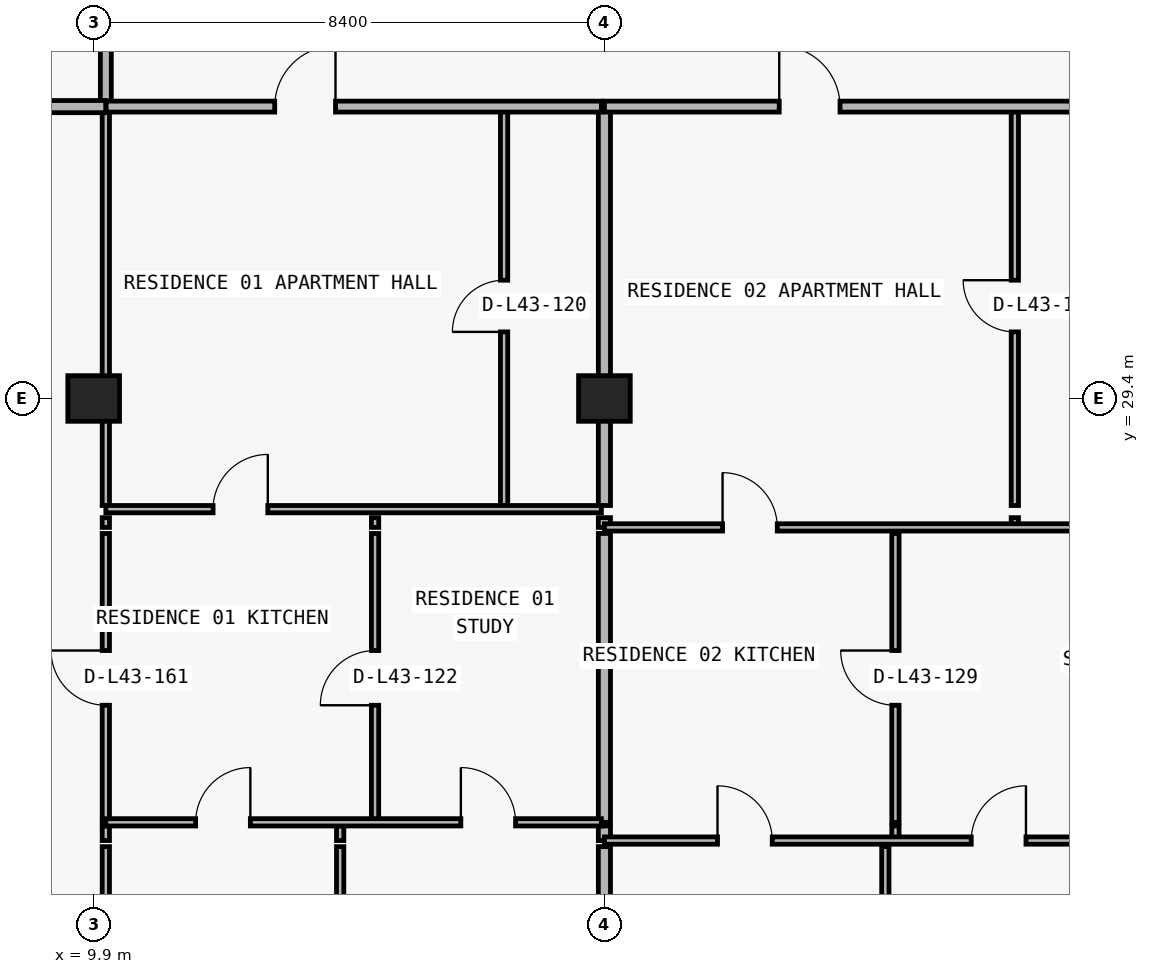
"""IFC4 building model, lengths in metres.
Left out: names, types, materials, properties, quantities, classifications, styles, units other than length and angle.
Written with IfcOpenShell. Run it as: python <this file> out.ifc"""

import sys

from ifc_helpers import new_model, si_unit, direction, frame, frame_2d, origin, origin_2d, place, context, subcontext, project, spatial, rectangle, extrude, element, fill, save


model = new_model("IFC4")
c1 = context("Model", 3, precision=1e-05, world=origin(), true_north=direction((0.0, 1.0)))
c2 = subcontext(c1, "Body", "Model", "MODEL_VIEW")
j1 = project(units=[si_unit("LENGTHUNIT", "METRE"), si_unit("PLANEANGLEUNIT", "RADIAN")], contexts=[c1])
p1 = place(None, origin())
s1 = spatial("IfcSite", under=j1, at=p1, CompositionType="ELEMENT")
p2 = place(p1, origin())
s2 = spatial("IfcBuilding", under=s1, at=p2, CompositionType="ELEMENT")
p3 = place(p2, frame((0.0, 0.0, 157.2)))
s3 = spatial("IfcBuildingStorey", under=s2, at=p3, CompositionType="ELEMENT", Elevation=157.2)
for number, where, z_axis, x_axis in (
    (1, (9.9, 29.4, 0.0), (0.0, 0.0, 1.0), (1.0, 0.0, 0.0)),
    (2, (18.3, 29.4, 0.0), (0.0, 0.0, 1.0), (1.0, 0.0, 0.0)),
):
    element("IfcColumn", number, at=place(p3, frame(where, z_axis=z_axis, x_axis=x_axis)), inside=s3, PredefinedType="COLUMN", context=c2, shape_type="SweptSolid", body=[
        extrude(rectangle(XDim=0.85, YDim=0.75, at=origin_2d()), origin(), (0.0, 0.0, 1.0), 3.05),
    ])
p4 = place(p3, frame((10.1, 11.285, 0.0), z_axis=(0.0, 0.0, 1.0), x_axis=(0.0, 1.0, 0.0)))
e3 = element("IfcWall", 3, at=p4, inside=s3, PredefinedType="PARTITIONING", context=c2, shape_type="SweptSolid", body=[
    extrude(rectangle(XDim=10.745, YDim=0.12, at=frame_2d((5.373, 0.0))), origin(), (0.0, 0.0, 1.0), 2.263),
])
p5 = place(p3, frame((10.1, 22.13, 0.0), z_axis=(0.0, 0.0, 1.0), x_axis=(0.0, 1.0, 0.0)))
e4 = element("IfcWall", 4, at=p5, inside=s3, PredefinedType="PARTITIONING", context=c2, shape_type="SweptSolid", body=[
    extrude(rectangle(XDim=0.24, YDim=0.12, at=frame_2d((0.12, 0.0))), origin(), (0.0, 0.0, 1.0), 2.263),
])
p6 = place(p3, frame((10.1, 22.43, 0.0), z_axis=(0.0, 0.0, 1.0), x_axis=(0.0, 1.0, 0.0)))
e5 = element("IfcWall", 5, at=p6, inside=s3, PredefinedType="PARTITIONING", context=c2, shape_type="SweptSolid", body=[
    extrude(rectangle(XDim=4.75, YDim=0.12, at=frame_2d((2.375, 0.0))), origin(), (0.0, 0.0, 1.0), 2.263),
])
p7 = place(p6, frame((1.925, 0.0, 0.0)))
e6 = element("IfcOpeningElement", 6, at=p7, cuts=e5, PredefinedType="OPENING", context=c2, shape_type="SweptSolid", body=[
    extrude(rectangle(XDim=0.9, YDim=2.15, at=frame_2d((0.45, 1.075))), frame((0.0, 0.07, 0.0), z_axis=(0.0, -1.0, 0.0), x_axis=(1.0, 0.0, 0.0)), (0.0, 0.0, 1.0), 0.14),
])
p8 = place(p3, frame((10.1, 27.28, 0.0), z_axis=(0.0, 0.0, 1.0), x_axis=(0.0, 1.0, 0.0)))
e7 = element("IfcWall", 7, at=p8, inside=s3, PredefinedType="PARTITIONING", context=c2, shape_type="SweptSolid", body=[
    extrude(rectangle(XDim=0.16, YDim=0.12, at=frame_2d((0.08, 0.0))), origin(), (0.0, 0.0, 1.0), 2.263),
])
p9 = place(p3, frame((10.1, 27.64, 0.0), z_axis=(0.0, 0.0, 1.0), x_axis=(0.0, 1.0, 0.0)))
e8 = element("IfcWall", 8, at=p9, inside=s3, PredefinedType="PARTITIONING", context=c2, shape_type="SweptSolid", body=[
    extrude(rectangle(XDim=6.56, YDim=0.12, at=frame_2d((3.28, 0.0))), origin(), (0.0, 0.0, 1.0), 2.263),
])
p10 = place(p3, frame((10.1, 34.205, 0.0), z_axis=(0.0, 0.0, 1.0), x_axis=(0.0, 1.0, 0.0)))
e9 = element("IfcWall", 9, at=p10, inside=s3, PredefinedType="PARTITIONING", context=c2, shape_type="SweptSolid", body=[
    extrude(rectangle(XDim=2.745, YDim=0.18, at=frame_2d((1.373, 0.0))), origin(), (0.0, 0.0, 1.0), 2.263),
])
p11 = place(p3, frame((13.954, 11.24, 0.0), z_axis=(0.0, 0.0, 1.0), x_axis=(0.0, 1.0, 0.0)))
e10 = element("IfcWall", 10, at=p11, inside=s3, PredefinedType="PARTITIONING", context=c2, shape_type="SweptSolid", body=[
    extrude(rectangle(XDim=10.79, YDim=0.12, at=frame_2d((5.395, 0.0))), origin(), (0.0, 0.0, 1.0), 2.725),
])
p12 = place(p3, frame((13.954, 22.13, 0.0), z_axis=(0.0, 0.0, 1.0), x_axis=(0.0, 1.0, 0.0)))
e11 = element("IfcWall", 11, at=p12, inside=s3, PredefinedType="PARTITIONING", context=c2, shape_type="SweptSolid", body=[
    extrude(rectangle(XDim=0.24, YDim=0.12, at=frame_2d((0.12, 0.0))), origin(), (0.0, 0.0, 1.0), 2.725),
])
p13 = place(p3, frame((14.528, 22.43, 0.0), z_axis=(0.0, 0.0, 1.0), x_axis=(0.0, 1.0, 0.0)))
e12 = element("IfcWall", 12, at=p13, inside=s3, PredefinedType="PARTITIONING", context=c2, shape_type="SweptSolid", body=[
    extrude(rectangle(XDim=4.75, YDim=0.12, at=frame_2d((2.375, 0.0))), origin(), (0.0, 0.0, 1.0), 3.05),
])
p14 = place(p13, frame((1.925, 0.0, 0.0)))
e13 = element("IfcOpeningElement", 13, at=p14, cuts=e12, PredefinedType="OPENING", context=c2, shape_type="SweptSolid", body=[
    extrude(rectangle(XDim=0.9, YDim=2.15, at=frame_2d((0.45, 1.075))), frame((0.0, 0.07, 0.0), z_axis=(0.0, -1.0, 0.0), x_axis=(1.0, 0.0, 0.0)), (0.0, 0.0, 1.0), 0.14),
])
p15 = place(p3, frame((14.528, 27.28, 0.0), z_axis=(0.0, 0.0, 1.0), x_axis=(0.0, 1.0, 0.0)))
e14 = element("IfcWall", 14, at=p15, inside=s3, PredefinedType="PARTITIONING", context=c2, shape_type="SweptSolid", body=[
    extrude(rectangle(XDim=0.16, YDim=0.12, at=frame_2d((0.08, 0.0))), origin(), (0.0, 0.0, 1.0), 3.05),
])
p16 = place(p3, frame((16.65, 27.64, 0.0), z_axis=(0.0, 0.0, 1.0), x_axis=(0.0, 1.0, 0.0)))
e15 = element("IfcWall", 15, at=p16, inside=s3, PredefinedType="PARTITIONING", context=c2, shape_type="SweptSolid", body=[
    extrude(rectangle(XDim=6.56, YDim=0.12, at=frame_2d((3.28, 0.0))), origin(), (0.0, 0.0, 1.0), 3.05),
])
p17 = place(p16, frame((2.855, 0.0, 0.0)))
e16 = element("IfcOpeningElement", 16, at=p17, cuts=e15, PredefinedType="OPENING", context=c2, shape_type="SweptSolid", body=[
    extrude(rectangle(XDim=0.85, YDim=2.1, at=frame_2d((0.425, 1.05))), frame((0.0, 0.07, 0.0), z_axis=(0.0, -1.0, 0.0), x_axis=(1.0, 0.0, 0.0)), (0.0, 0.0, 1.0), 0.14),
])
p18 = place(p3, frame((18.3, 11.24, 0.0), z_axis=(0.0, 0.0, 1.0), x_axis=(0.0, 1.0, 0.0)))
e17 = element("IfcWall", 17, at=p18, inside=s3, PredefinedType="PARTITIONING", context=c2, shape_type="SweptSolid", body=[
    extrude(rectangle(XDim=10.79, YDim=0.2, at=frame_2d((5.395, 0.0))), origin(), (0.0, 0.0, 1.0), 2.263),
])
p19 = place(p3, frame((18.3, 22.13, 0.0), z_axis=(0.0, 0.0, 1.0), x_axis=(0.0, 1.0, 0.0)))
e18 = element("IfcWall", 18, at=p19, inside=s3, PredefinedType="PARTITIONING", context=c2, shape_type="SweptSolid", body=[
    extrude(rectangle(XDim=0.24, YDim=0.2, at=frame_2d((0.12, 0.0))), origin(), (0.0, 0.0, 1.0), 2.263),
])
p20 = place(p3, frame((18.3, 22.43, 0.0), z_axis=(0.0, 0.0, 1.0), x_axis=(0.0, 1.0, 0.0)))
e19 = element("IfcWall", 19, at=p20, inside=s3, PredefinedType="PARTITIONING", context=c2, shape_type="SweptSolid", body=[
    extrude(rectangle(XDim=4.75, YDim=0.2, at=frame_2d((2.375, 0.0))), origin(), (0.0, 0.0, 1.0), 2.263),
])
p21 = place(p3, frame((18.3, 27.28, 0.0), z_axis=(0.0, 0.0, 1.0), x_axis=(0.0, 1.0, 0.0)))
e20 = element("IfcWall", 20, at=p21, inside=s3, PredefinedType="PARTITIONING", context=c2, shape_type="SweptSolid", body=[
    extrude(rectangle(XDim=0.16, YDim=0.2, at=frame_2d((0.08, 0.0))), origin(), (0.0, 0.0, 1.0), 2.263),
])
p22 = place(p3, frame((18.3, 27.64, 0.0), z_axis=(0.0, 0.0, 1.0), x_axis=(0.0, 1.0, 0.0)))
e21 = element("IfcWall", 21, at=p22, inside=s3, PredefinedType="PARTITIONING", context=c2, shape_type="SweptSolid", body=[
    extrude(rectangle(XDim=6.56, YDim=0.2, at=frame_2d((3.28, 0.0))), origin(), (0.0, 0.0, 1.0), 2.263),
])
p23 = place(p3, frame((22.92, 11.24, 0.0), z_axis=(0.0, 0.0, 1.0), x_axis=(0.0, 1.0, 0.0)))
e22 = element("IfcWall", 22, at=p23, inside=s3, PredefinedType="PARTITIONING", context=c2, shape_type="SweptSolid", body=[
    extrude(rectangle(XDim=10.79, YDim=0.12, at=frame_2d((5.395, 0.0))), origin(), (0.0, 0.0, 1.0), 3.05),
])
p24 = place(p3, frame((23.086, 22.13, 0.0), z_axis=(0.0, 0.0, 1.0), x_axis=(0.0, 1.0, 0.0)))
e23 = element("IfcWall", 23, at=p24, inside=s3, PredefinedType="PARTITIONING", context=c2, shape_type="SweptSolid", body=[
    extrude(rectangle(XDim=0.24, YDim=0.12, at=frame_2d((0.12, 0.0))), origin(), (0.0, 0.0, 1.0), 3.05),
])
p25 = place(p3, frame((23.086, 22.43, 0.0), z_axis=(0.0, 0.0, 1.0), x_axis=(0.0, 1.0, 0.0)))
e24 = element("IfcWall", 24, at=p25, inside=s3, PredefinedType="PARTITIONING", context=c2, shape_type="SweptSolid", body=[
    extrude(rectangle(XDim=4.75, YDim=0.12, at=frame_2d((2.375, 0.0))), origin(), (0.0, 0.0, 1.0), 3.05),
])
p26 = place(p25, frame((1.925, 0.0, 0.0)))
e25 = element("IfcOpeningElement", 25, at=p26, cuts=e24, PredefinedType="OPENING", context=c2, shape_type="SweptSolid", body=[
    extrude(rectangle(XDim=0.9, YDim=2.15, at=frame_2d((0.45, 1.075))), frame((0.0, 0.07, 0.0), z_axis=(0.0, -1.0, 0.0), x_axis=(1.0, 0.0, 0.0)), (0.0, 0.0, 1.0), 0.14),
])
p27 = place(p3, frame((25.05, 27.28, 0.0), z_axis=(0.0, 0.0, 1.0), x_axis=(0.0, 1.0, 0.0)))
e26 = element("IfcWall", 26, at=p27, inside=s3, PredefinedType="PARTITIONING", context=c2, shape_type="SweptSolid", body=[
    extrude(rectangle(XDim=0.16, YDim=0.12, at=frame_2d((0.08, 0.0))), origin(), (0.0, 0.0, 1.0), 3.05),
])
p28 = place(p3, frame((25.05, 27.64, 0.0), z_axis=(0.0, 0.0, 1.0), x_axis=(0.0, 1.0, 0.0)))
e27 = element("IfcWall", 27, at=p28, inside=s3, PredefinedType="PARTITIONING", context=c2, shape_type="SweptSolid", body=[
    extrude(rectangle(XDim=6.56, YDim=0.12, at=frame_2d((3.28, 0.0))), origin(), (0.0, 0.0, 1.0), 3.05),
])
p29 = place(p28, frame((2.855, 0.0, 0.0)))
e28 = element("IfcOpeningElement", 28, at=p29, cuts=e27, PredefinedType="OPENING", context=c2, shape_type="SweptSolid", body=[
    extrude(rectangle(XDim=0.85, YDim=2.1, at=frame_2d((0.425, 1.05))), frame((0.0, 0.07, 0.0), z_axis=(0.0, -1.0, 0.0), x_axis=(1.0, 0.0, 0.0)), (0.0, 0.0, 1.0), 0.14),
])
p30 = place(p3, frame((18.3, 22.13, 0.0), z_axis=(0.0, 0.0, 1.0), x_axis=(1.0, 0.0, 0.0)))
e29 = element("IfcWall", 29, at=p30, inside=s3, PredefinedType="PARTITIONING", context=c2, shape_type="SweptSolid", body=[
    extrude(rectangle(XDim=8.18, YDim=0.12, at=frame_2d((4.09, 0.0))), origin(), (0.0, 0.0, 1.0), 3.05),
])
p31 = place(p30, frame((1.86, 0.0, 0.0)))
e30 = element("IfcOpeningElement", 30, at=p31, cuts=e29, PredefinedType="OPENING", context=c2, shape_type="SweptSolid", body=[
    extrude(rectangle(XDim=0.9, YDim=2.15, at=frame_2d((0.45, 1.075))), frame((0.0, 0.07, 0.0), z_axis=(0.0, -1.0, 0.0), x_axis=(1.0, 0.0, 0.0)), (0.0, 0.0, 1.0), 0.14),
])
p32 = place(p30, frame((6.033, 0.0, 0.0)))
e31 = element("IfcOpeningElement", 31, at=p32, cuts=e29, PredefinedType="OPENING", context=c2, shape_type="SweptSolid", body=[
    extrude(rectangle(XDim=0.9, YDim=2.15, at=frame_2d((0.45, 1.075))), frame((0.0, 0.07, 0.0), z_axis=(0.0, -1.0, 0.0), x_axis=(1.0, 0.0, 0.0)), (0.0, 0.0, 1.0), 0.14),
])
p33 = place(p3, frame((10.1, 22.43, 0.0), z_axis=(0.0, 0.0, 1.0), x_axis=(1.0, 0.0, 0.0)))
e32 = element("IfcWall", 32, at=p33, inside=s3, PredefinedType="PARTITIONING", context=c2, shape_type="SweptSolid", body=[
    extrude(rectangle(XDim=8.15, YDim=0.12, at=frame_2d((4.075, 0.0))), origin(), (0.0, 0.0, 1.0), 3.05),
])
p34 = place(p33, frame((1.477, 0.0, 0.0)))
e33 = element("IfcOpeningElement", 33, at=p34, cuts=e32, PredefinedType="OPENING", context=c2, shape_type="SweptSolid", body=[
    extrude(rectangle(XDim=0.9, YDim=2.15, at=frame_2d((0.45, 1.075))), frame((0.0, 0.07, 0.0), z_axis=(0.0, -1.0, 0.0), x_axis=(1.0, 0.0, 0.0)), (0.0, 0.0, 1.0), 0.14),
])
p35 = place(p33, frame((5.839, 0.0, 0.0)))
e34 = element("IfcOpeningElement", 34, at=p35, cuts=e32, PredefinedType="OPENING", context=c2, shape_type="SweptSolid", body=[
    extrude(rectangle(XDim=0.9, YDim=2.15, at=frame_2d((0.45, 1.075))), frame((0.0, 0.07, 0.0), z_axis=(0.0, -1.0, 0.0), x_axis=(1.0, 0.0, 0.0)), (0.0, 0.0, 1.0), 0.14),
])
p36 = place(p3, frame((18.3, 27.28, 0.0), z_axis=(0.0, 0.0, 1.0), x_axis=(1.0, 0.0, 0.0)))
e35 = element("IfcWall", 35, at=p36, inside=s3, PredefinedType="PARTITIONING", context=c2, shape_type="SweptSolid", body=[
    extrude(rectangle(XDim=8.18, YDim=0.12, at=frame_2d((4.09, 0.0))), origin(), (0.0, 0.0, 1.0), 3.05),
])
p37 = place(p36, frame((1.943, 0.0, 0.0)))
e36 = element("IfcOpeningElement", 36, at=p37, cuts=e35, PredefinedType="OPENING", context=c2, shape_type="SweptSolid", body=[
    extrude(rectangle(XDim=0.9, YDim=2.15, at=frame_2d((0.45, 1.075))), frame((0.0, 0.07, 0.0), z_axis=(0.0, -1.0, 0.0), x_axis=(1.0, 0.0, 0.0)), (0.0, 0.0, 1.0), 0.14),
])
p38 = place(p3, frame((10.1, 27.58, 0.0), z_axis=(0.0, 0.0, 1.0), x_axis=(1.0, 0.0, 0.0)))
e37 = element("IfcWall", 37, at=p38, inside=s3, PredefinedType="PARTITIONING", context=c2, shape_type="SweptSolid", body=[
    extrude(rectangle(XDim=8.15, YDim=0.12, at=frame_2d((4.075, 0.0))), origin(), (0.0, 0.0, 1.0), 3.05),
])
p39 = place(p38, frame((1.764, 0.0, 0.0)))
e38 = element("IfcOpeningElement", 38, at=p39, cuts=e37, PredefinedType="OPENING", context=c2, shape_type="SweptSolid", body=[
    extrude(rectangle(XDim=0.9, YDim=2.15, at=frame_2d((0.45, 1.075))), frame((0.0, 0.07, 0.0), z_axis=(0.0, -1.0, 0.0), x_axis=(1.0, 0.0, 0.0)), (0.0, 0.0, 1.0), 0.14),
])
p40 = place(p3, frame((6.395, 34.2, 0.0), z_axis=(0.0, 0.0, 1.0), x_axis=(1.0, 0.0, 0.0)))
e39 = element("IfcWall", 39, at=p40, inside=s3, PredefinedType="PARTITIONING", context=c2, shape_type="SweptSolid", body=[
    extrude(rectangle(XDim=3.705, YDim=0.2, at=frame_2d((1.853, 0.0))), origin(), (0.0, 0.0, 1.0), 3.05),
])
p41 = place(p3, frame((10.105, 34.2, 0.0), z_axis=(0.0, 0.0, 1.0), x_axis=(1.0, 0.0, 0.0)))
e40 = element("IfcWall", 40, at=p41, inside=s3, PredefinedType="PARTITIONING", context=c2, shape_type="SweptSolid", body=[
    extrude(rectangle(XDim=8.145, YDim=0.18, at=frame_2d((4.073, 0.0))), origin(), (0.0, 0.0, 1.0), 3.05),
])
p42 = place(p41, frame((2.772, 0.0, 0.0)))
e41 = element("IfcOpeningElement", 41, at=p42, cuts=e40, PredefinedType="OPENING", context=c2, shape_type="SweptSolid", body=[
    extrude(rectangle(XDim=1.0, YDim=2.2, at=frame_2d((0.5, 1.1))), frame((0.0, 0.1, 0.0), z_axis=(0.0, -1.0, 0.0), x_axis=(1.0, 0.0, 0.0)), (0.0, 0.0, 1.0), 0.2),
])
p43 = place(p3, frame((18.3, 34.2, 0.0), z_axis=(0.0, 0.0, 1.0), x_axis=(1.0, 0.0, 0.0)))
e42 = element("IfcWall", 42, at=p43, inside=s3, PredefinedType="PARTITIONING", context=c2, shape_type="SweptSolid", body=[
    extrude(rectangle(XDim=37.586, YDim=0.18, at=frame_2d((18.793, 0.0))), origin(), (0.0, 0.0, 1.0), 3.05),
])
p44 = place(p43, frame((2.875, 0.0, 0.0)))
e43 = element("IfcOpeningElement", 43, at=p44, cuts=e42, PredefinedType="OPENING", context=c2, shape_type="SweptSolid", body=[
    extrude(rectangle(XDim=1.0, YDim=2.2, at=frame_2d((0.5, 1.1))), frame((0.0, 0.1, 0.0), z_axis=(0.0, -1.0, 0.0), x_axis=(1.0, 0.0, 0.0)), (0.0, 0.0, 1.0), 0.2),
])
p45 = place(p43, frame((11.315, 0.0, 0.0)))
e44 = element("IfcOpeningElement", 44, at=p45, cuts=e42, PredefinedType="OPENING", context=c2, shape_type="SweptSolid", body=[
    extrude(rectangle(XDim=1.0, YDim=2.2, at=frame_2d((0.5, 1.1))), frame((0.0, 0.1, 0.0), z_axis=(0.0, -1.0, 0.0), x_axis=(1.0, 0.0, 0.0)), (0.0, 0.0, 1.0), 0.2),
])
p46 = place(p43, frame((27.275, 0.0, 0.0)))
e45 = element("IfcOpeningElement", 45, at=p46, cuts=e42, PredefinedType="OPENING", context=c2, shape_type="SweptSolid", body=[
    extrude(rectangle(XDim=1.0, YDim=2.2, at=frame_2d((0.5, 1.1))), frame((0.0, 0.1, 0.0), z_axis=(0.0, -1.0, 0.0), x_axis=(1.0, 0.0, 0.0)), (0.0, 0.0, 1.0), 0.2),
])
p47 = place(p43, frame((34.693, 0.0, 0.0)))
e46 = element("IfcOpeningElement", 46, at=p47, cuts=e42, PredefinedType="OPENING", context=c2, shape_type="SweptSolid", body=[
    extrude(rectangle(XDim=1.0, YDim=2.2, at=frame_2d((0.5, 1.1))), frame((0.0, 0.1, 0.0), z_axis=(0.0, -1.0, 0.0), x_axis=(1.0, 0.0, 0.0)), (0.0, 0.0, 1.0), 0.2),
])
p48 = place(p42, origin())
e47 = element("IfcDoor", 47, at=p48, inside=s3, OperationType="SINGLE_SWING_RIGHT", PredefinedType="DOOR", context=c2, shape_type="SweptSolid", body=[
    extrude(rectangle(XDim=1.0, YDim=2.2, at=frame_2d((0.5, 1.1))), frame((0.0, 0.025, 0.0), z_axis=(0.0, -1.0, 0.0), x_axis=(1.0, 0.0, 0.0)), (0.0, 0.0, 1.0), 0.05),
])
fill(e41, e47)
p49 = place(p17, origin())
e48 = element("IfcDoor", 48, at=p49, inside=s3, OperationType="SINGLE_SWING_LEFT", PredefinedType="DOOR", context=c2, shape_type="SweptSolid", body=[
    extrude(rectangle(XDim=0.85, YDim=2.1, at=frame_2d((0.425, 1.05))), frame((0.0, 0.025, 0.0), z_axis=(0.0, -1.0, 0.0), x_axis=(1.0, 0.0, 0.0)), (0.0, 0.0, 1.0), 0.05),
])
fill(e16, e48)
p50 = place(p39, origin())
e49 = element("IfcDoor", 49, at=p50, inside=s3, OperationType="SINGLE_SWING_RIGHT", PredefinedType="DOOR", context=c2, shape_type="SweptSolid", body=[
    extrude(rectangle(XDim=0.9, YDim=2.15, at=frame_2d((0.45, 1.075))), frame((0.0, 0.025, 0.0), z_axis=(0.0, -1.0, 0.0), x_axis=(1.0, 0.0, 0.0)), (0.0, 0.0, 1.0), 0.05),
])
fill(e38, e49)
p51 = place(p14, origin())
e50 = element("IfcDoor", 50, at=p51, inside=s3, OperationType="SINGLE_SWING_LEFT", PredefinedType="DOOR", context=c2, shape_type="SweptSolid", body=[
    extrude(rectangle(XDim=0.9, YDim=2.15, at=frame_2d((0.45, 1.075))), frame((0.0, 0.025, 0.0), z_axis=(0.0, -1.0, 0.0), x_axis=(1.0, 0.0, 0.0)), (0.0, 0.0, 1.0), 0.05),
])
fill(e13, e50)
p52 = place(p34, origin())
e51 = element("IfcDoor", 51, at=p52, inside=s3, OperationType="SINGLE_SWING_RIGHT", PredefinedType="DOOR", context=c2, shape_type="SweptSolid", body=[
    extrude(rectangle(XDim=0.9, YDim=2.15, at=frame_2d((0.45, 1.075))), frame((0.0, 0.025, 0.0), z_axis=(0.0, -1.0, 0.0), x_axis=(1.0, 0.0, 0.0)), (0.0, 0.0, 1.0), 0.05),
])
fill(e33, e51)
p53 = place(p35, origin())
e52 = element("IfcDoor", 52, at=p53, inside=s3, OperationType="SINGLE_SWING_LEFT", PredefinedType="DOOR", context=c2, shape_type="SweptSolid", body=[
    extrude(rectangle(XDim=0.9, YDim=2.15, at=frame_2d((0.45, 1.075))), frame((0.0, 0.025, 0.0), z_axis=(0.0, -1.0, 0.0), x_axis=(1.0, 0.0, 0.0)), (0.0, 0.0, 1.0), 0.05),
])
fill(e34, e52)
p54 = place(p44, origin())
e53 = element("IfcDoor", 53, at=p54, inside=s3, OperationType="SINGLE_SWING_LEFT", PredefinedType="DOOR", context=c2, shape_type="SweptSolid", body=[
    extrude(rectangle(XDim=1.0, YDim=2.2, at=frame_2d((0.5, 1.1))), frame((0.0, 0.025, 0.0), z_axis=(0.0, -1.0, 0.0), x_axis=(1.0, 0.0, 0.0)), (0.0, 0.0, 1.0), 0.05),
])
fill(e43, e53)
p55 = place(p29, origin())
e54 = element("IfcDoor", 54, at=p55, inside=s3, OperationType="SINGLE_SWING_RIGHT", PredefinedType="DOOR", context=c2, shape_type="SweptSolid", body=[
    extrude(rectangle(XDim=0.85, YDim=2.1, at=frame_2d((0.425, 1.05))), frame((0.0, 0.025, 0.0), z_axis=(0.0, -1.0, 0.0), x_axis=(1.0, 0.0, 0.0)), (0.0, 0.0, 1.0), 0.05),
])
fill(e28, e54)
p56 = place(p37, origin())
e55 = element("IfcDoor", 55, at=p56, inside=s3, OperationType="SINGLE_SWING_LEFT", PredefinedType="DOOR", context=c2, shape_type="SweptSolid", body=[
    extrude(rectangle(XDim=0.9, YDim=2.15, at=frame_2d((0.45, 1.075))), frame((0.0, 0.025, 0.0), z_axis=(0.0, -1.0, 0.0), x_axis=(1.0, 0.0, 0.0)), (0.0, 0.0, 1.0), 0.05),
])
fill(e36, e55)
p57 = place(p26, origin())
e56 = element("IfcDoor", 56, at=p57, inside=s3, OperationType="SINGLE_SWING_RIGHT", PredefinedType="DOOR", context=c2, shape_type="SweptSolid", body=[
    extrude(rectangle(XDim=0.9, YDim=2.15, at=frame_2d((0.45, 1.075))), frame((0.0, 0.025, 0.0), z_axis=(0.0, -1.0, 0.0), x_axis=(1.0, 0.0, 0.0)), (0.0, 0.0, 1.0), 0.05),
])
fill(e25, e56)
p58 = place(p31, origin())
e57 = element("IfcDoor", 57, at=p58, inside=s3, OperationType="SINGLE_SWING_LEFT", PredefinedType="DOOR", context=c2, shape_type="SweptSolid", body=[
    extrude(rectangle(XDim=0.9, YDim=2.15, at=frame_2d((0.45, 1.075))), frame((0.0, 0.025, 0.0), z_axis=(0.0, -1.0, 0.0), x_axis=(1.0, 0.0, 0.0)), (0.0, 0.0, 1.0), 0.05),
])
fill(e30, e57)
p59 = place(p32, origin())
e58 = element("IfcDoor", 58, at=p59, inside=s3, OperationType="SINGLE_SWING_RIGHT", PredefinedType="DOOR", context=c2, shape_type="SweptSolid", body=[
    extrude(rectangle(XDim=0.9, YDim=2.15, at=frame_2d((0.45, 1.075))), frame((0.0, 0.025, 0.0), z_axis=(0.0, -1.0, 0.0), x_axis=(1.0, 0.0, 0.0)), (0.0, 0.0, 1.0), 0.05),
])
fill(e31, e58)
p60 = place(p7, origin())
e59 = element("IfcDoor", 59, at=p60, inside=s3, OperationType="SINGLE_SWING_RIGHT", PredefinedType="DOOR", context=c2, shape_type="SweptSolid", body=[
    extrude(rectangle(XDim=0.9, YDim=2.15, at=frame_2d((0.45, 1.075))), frame((0.0, 0.025, 0.0), z_axis=(0.0, -1.0, 0.0), x_axis=(1.0, 0.0, 0.0)), (0.0, 0.0, 1.0), 0.05),
])
fill(e6, e59)
save(model, sys.argv[1])
